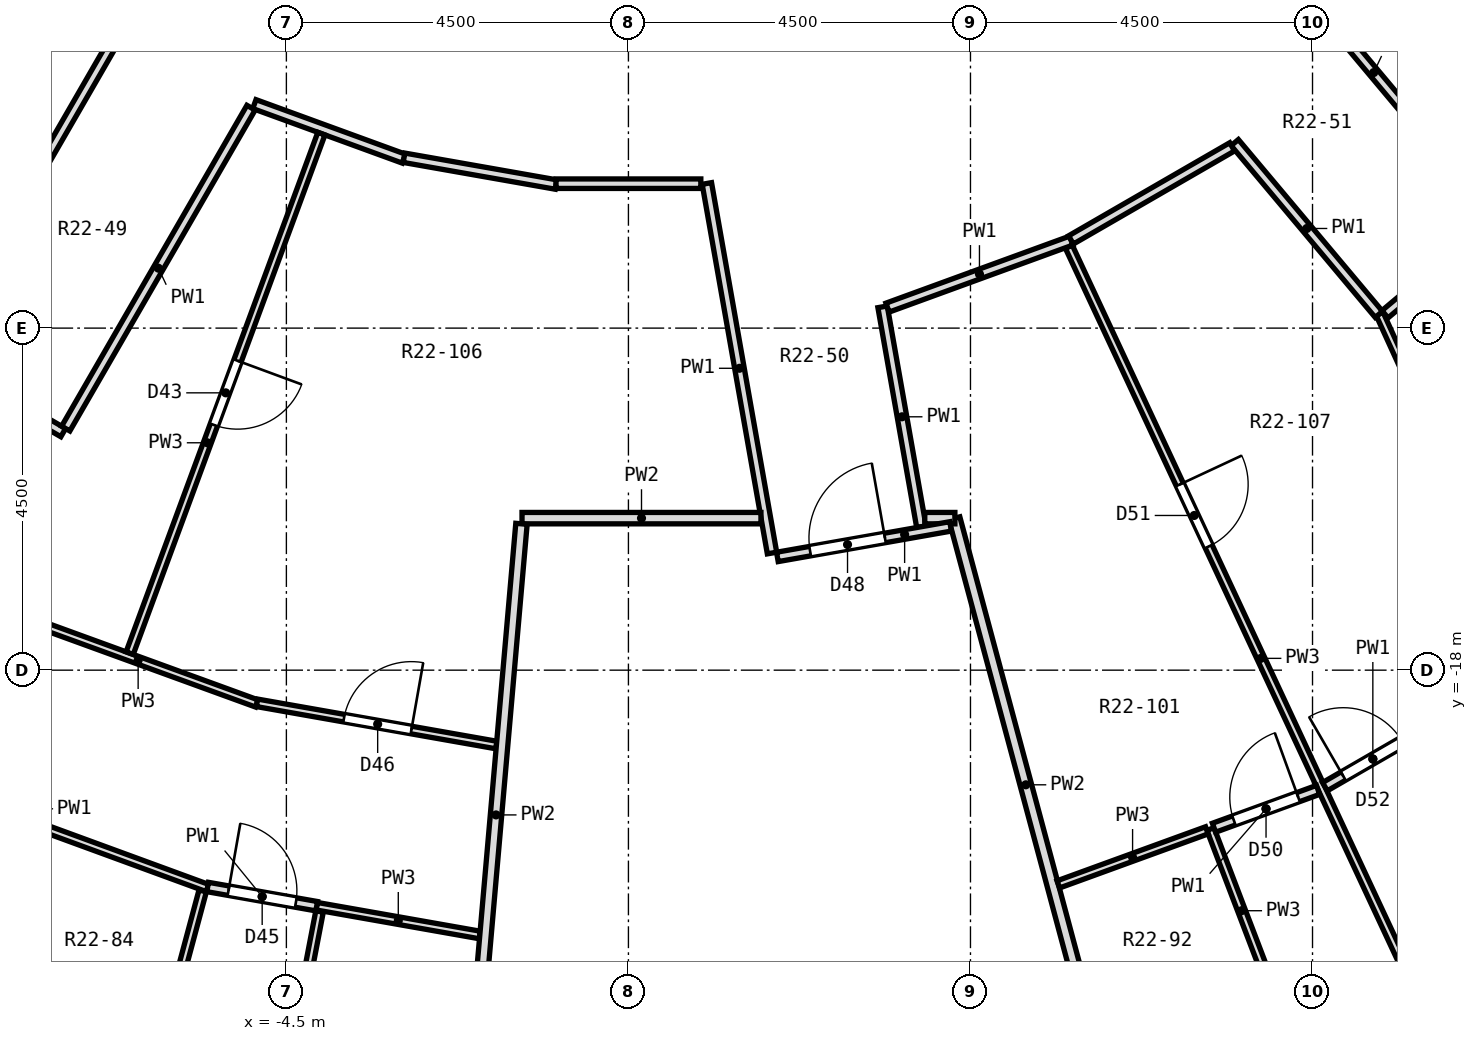
"""IFC4 building model, lengths in metres.
Left out: names, types, materials, properties, quantities, classifications, styles, units other than length and angle.
Written with IfcOpenShell. Run it as: python <this file> out.ifc"""

import sys

from ifc_helpers import new_model, si_unit, direction, frame, frame_2d, origin, place, context, subcontext, project, spatial, rectangle, extrude, element, fill, save


model = new_model("IFC4")
c1 = context("Model", 3, precision=1e-05, world=origin(), true_north=direction((0.0, 1.0)))
c2 = subcontext(c1, "Body", "Model", "MODEL_VIEW")
j1 = project(units=[si_unit("LENGTHUNIT", "METRE"), si_unit("PLANEANGLEUNIT", "RADIAN")], contexts=[c1])
p1 = place(None, origin())
s1 = spatial("IfcSite", under=j1, at=p1, CompositionType="ELEMENT")
p2 = place(p1, origin())
s2 = spatial("IfcBuilding", under=s1, at=p2, CompositionType="ELEMENT")
p3 = place(p2, frame((0.0, 0.0, 141.4)))
s3 = spatial("IfcBuildingStorey", under=s2, at=p3, CompositionType="ELEMENT", Elevation=141.4)
p4 = place(p3, frame((1.032, -11.597, 0.0), z_axis=(0.0, 0.0, 1.0), x_axis=(0.173613257536, -0.984813909735, 0.0)))
e1 = element("IfcWall", 1, at=p4, inside=s3, PredefinedType="PARTITIONING", context=c2, shape_type="SweptSolid", body=[
    extrude(rectangle(XDim=4.937, YDim=0.125, at=frame_2d((2.469, 0.0))), origin(), (0.0, 0.0, 1.0), 2.8),
])
p5 = place(p3, frame((3.344, -13.22, 0.0), z_axis=(0.0, 0.0, 1.0), x_axis=(0.173704731119, -0.984797779438, 0.0)))
e2 = element("IfcWall", 2, at=p5, inside=s3, PredefinedType="PARTITIONING", context=c2, shape_type="SweptSolid", body=[
    extrude(rectangle(XDim=2.938, YDim=0.125, at=frame_2d((1.469, 0.0))), origin(), (0.0, 0.0, 1.0), 2.8),
])
p6 = place(p3, frame((4.288, -16.002, 0.0), z_axis=(0.0, 0.0, 1.0), x_axis=(0.25900000819, -0.965877319207, 0.0)))
e3 = element("IfcWall", 3, at=p6, inside=s3, PredefinedType="PARTITIONING", context=c2, shape_type="SweptSolid", body=[
    extrude(rectangle(XDim=7.259, YDim=0.15, at=frame_2d((3.63, 0.0))), origin(), (0.0, 0.0, 1.0), 2.8),
])
p7 = place(p3, frame((7.657, -20.09, 0.0), z_axis=(0.0, 0.0, 1.0), x_axis=(0.35616749028, -0.934422130981, 0.0)))
e4 = element("IfcWall", 4, at=p7, inside=s3, PredefinedType="PARTITIONING", context=c2, shape_type="SweptSolid", body=[
    extrude(rectangle(XDim=2.3, YDim=0.1, at=frame_2d((1.15, 0.0))), origin(), (0.0, 0.0, 1.0), 2.8),
])
p8 = place(p3, frame((9.883, -13.312, 0.0), z_axis=(0.0, 0.0, 1.0), x_axis=(0.415273903312, -0.909696424764, 0.0)))
e5 = element("IfcWall", 5, at=p8, inside=s3, PredefinedType="PARTITIONING", context=c2, shape_type="SweptSolid", body=[
    extrude(rectangle(XDim=5.0, YDim=0.1, at=frame_2d((2.5, 0.0))), origin(), (0.0, 0.0, 1.0), 2.8),
])
p9 = place(p8, frame((3.166, 0.0, 0.0)))
e6 = element("IfcOpeningElement", 6, at=p9, cuts=e5, PredefinedType="OPENING", context=c2, shape_type="SweptSolid", body=[
    extrude(rectangle(XDim=0.9, YDim=2.1, at=frame_2d((0.45, 1.05))), frame((0.0, 0.062, 0.0), z_axis=(0.0, -1.0, 0.0), x_axis=(1.0, 0.0, 0.0)), (0.0, 0.0, 1.0), 0.124),
])
p10 = place(p3, frame((5.794, -12.43, 0.0), z_axis=(0.0, 0.0, 1.0), x_axis=(0.422795993745, -0.906224888023, 0.0)))
e7 = element("IfcWall", 7, at=p10, inside=s3, PredefinedType="PARTITIONING", context=c2, shape_type="SweptSolid", body=[
    extrude(rectangle(XDim=11.951, YDim=0.1, at=frame_2d((5.975, 0.0))), origin(), (0.0, 0.0, 1.0), 2.8),
])
p11 = place(p10, frame((3.451, 0.0, 0.0)))
e8 = element("IfcOpeningElement", 8, at=p11, cuts=e7, PredefinedType="OPENING", context=c2, shape_type="SweptSolid", body=[
    extrude(rectangle(XDim=0.9, YDim=2.1, at=frame_2d((0.45, 1.05))), frame((0.0, 0.062, 0.0), z_axis=(0.0, -1.0, 0.0), x_axis=(1.0, 0.0, 0.0)), (0.0, 0.0, 1.0), 0.124),
])
p12 = place(p3, frame((7.977, -11.059, 0.0), z_axis=(0.0, 0.0, 1.0), x_axis=(0.642679638204, -0.766135028985, 0.0)))
e9 = element("IfcWall", 9, at=p12, inside=s3, PredefinedType="PARTITIONING", context=c2, shape_type="SweptSolid", body=[
    extrude(rectangle(XDim=2.95, YDim=0.125, at=frame_2d((1.475, 0.0))), origin(), (0.0, 0.0, 1.0), 2.8),
])
p13 = place(p3, frame((8.22, -8.247, 0.0), z_axis=(0.0, 0.0, 1.0), x_axis=(0.642555132876, -0.766239454228, 0.0)))
e10 = element("IfcWall", 10, at=p13, inside=s3, PredefinedType="PARTITIONING", context=c2, shape_type="SweptSolid", body=[
    extrude(rectangle(XDim=4.937, YDim=0.125, at=frame_2d((2.468, 0.0))), origin(), (0.0, 0.0, 1.0), 2.8),
])
p14 = place(p3, frame((-9.166, -13.876, 0.0), z_axis=(0.0, 0.0, 1.0), x_axis=(0.866008543052, -0.500029202507, 0.0)))
e11 = element("IfcWall", 11, at=p14, inside=s3, PredefinedType="PARTITIONING", context=c2, shape_type="SweptSolid", body=[
    extrude(rectangle(XDim=1.998, YDim=0.125, at=frame_2d((0.999, 0.0))), origin(), (0.0, 0.0, 1.0), 2.8),
])
p15 = place(p3, frame((-7.704, -20.073, 0.0), z_axis=(0.0, 0.0, 1.0), x_axis=(0.939002837997, -0.343909392476, 0.0)))
e12 = element("IfcWall", 12, at=p15, inside=s3, PredefinedType="PARTITIONING", context=c2, shape_type="SweptSolid", body=[
    extrude(rectangle(XDim=2.306, YDim=0.1, at=frame_2d((1.153, 0.0))), origin(), (0.0, 0.0, 1.0), 2.8),
])
p16 = place(p3, frame((-8.013, -17.301, 0.0), z_axis=(0.0, 0.0, 1.0), x_axis=(0.939703357515, -0.341990642965, 0.0)))
e13 = element("IfcWall", 13, at=p16, inside=s3, PredefinedType="PARTITIONING", context=c2, shape_type="SweptSolid", body=[
    extrude(rectangle(XDim=3.325, YDim=0.1, at=frame_2d((1.663, 0.0))), origin(), (0.0, 0.0, 1.0), 2.8),
])
p17 = place(p3, frame((-4.921, -10.553, 0.0), z_axis=(0.0, 0.0, 1.0), x_axis=(0.939408005118, -0.342801108399, 0.0)))
e14 = element("IfcWall", 14, at=p17, inside=s3, PredefinedType="PARTITIONING", context=c2, shape_type="SweptSolid", body=[
    extrude(rectangle(XDim=2.093, YDim=0.125, at=frame_2d((1.046, 0.0))), origin(), (0.0, 0.0, 1.0), 2.8),
])
p18 = place(p3, frame((-4.101, -21.105, 0.0), z_axis=(0.0, 0.0, 1.0), x_axis=(0.984793705714, -0.173727825019, 0.0)))
e15 = element("IfcWall", 15, at=p18, inside=s3, PredefinedType="PARTITIONING", context=c2, shape_type="SweptSolid", body=[
    extrude(rectangle(XDim=2.18, YDim=0.1, at=frame_2d((1.09, 0.0))), origin(), (0.0, 0.0, 1.0), 2.8),
])
p19 = place(p3, frame((-5.536, -20.853, 0.0), z_axis=(0.0, 0.0, 1.0), x_axis=(0.984862774054, -0.173335848233, 0.0)))
e16 = element("IfcWall", 16, at=p19, inside=s3, PredefinedType="PARTITIONING", context=c2, shape_type="SweptSolid", body=[
    extrude(rectangle(XDim=1.456, YDim=0.125, at=frame_2d((0.728, 0.0))), origin(), (0.0, 0.0, 1.0), 2.8),
])
p20 = place(p19, frame((0.278, 0.0, 0.0)))
e17 = element("IfcOpeningElement", 17, at=p20, cuts=e16, PredefinedType="OPENING", context=c2, shape_type="SweptSolid", body=[
    extrude(rectangle(XDim=0.9, YDim=2.1, at=frame_2d((0.45, 1.05))), frame((0.0, 0.074, 0.0), z_axis=(0.0, -1.0, 0.0), x_axis=(1.0, 0.0, 0.0)), (0.0, 0.0, 1.0), 0.149),
])
p21 = place(p3, frame((-4.887, -18.43, 0.0), z_axis=(0.0, 0.0, 1.0), x_axis=(0.984827318257, -0.173537181071, 0.0)))
e18 = element("IfcWall", 18, at=p21, inside=s3, PredefinedType="PARTITIONING", context=c2, shape_type="SweptSolid", body=[
    extrude(rectangle(XDim=3.199, YDim=0.1, at=frame_2d((1.6, 0.0))), origin(), (0.0, 0.0, 1.0), 2.8),
])
p22 = place(p21, frame((1.162, 0.0, 0.0)))
e19 = element("IfcOpeningElement", 19, at=p22, cuts=e18, PredefinedType="OPENING", context=c2, shape_type="SweptSolid", body=[
    extrude(rectangle(XDim=0.9, YDim=2.1, at=frame_2d((0.45, 1.05))), frame((0.0, 0.062, 0.0), z_axis=(0.0, -1.0, 0.0), x_axis=(1.0, 0.0, 0.0)), (0.0, 0.0, 1.0), 0.124),
])
p23 = place(p3, frame((-2.952, -11.259, 0.0), z_axis=(0.0, 0.0, 1.0), x_axis=(0.984837972304, -0.173476708256, 0.0)))
e20 = element("IfcWall", 20, at=p23, inside=s3, PredefinedType="PARTITIONING", context=c2, shape_type="SweptSolid", body=[
    extrude(rectangle(XDim=2.031, YDim=0.125, at=frame_2d((1.015, 0.0))), origin(), (0.0, 0.0, 1.0), 2.8),
])
p24 = place(p3, frame((-1.4, -16.0, 0.0), z_axis=(0.0, 0.0, 1.0), x_axis=(1.0, 0.0, 0.0)))
e21 = element("IfcWall", 21, at=p24, inside=s3, PredefinedType="PARTITIONING", context=c2, shape_type="SweptSolid", body=[
    extrude(rectangle(XDim=3.143, YDim=0.15, at=frame_2d((1.572, 0.0))), origin(), (0.0, 0.0, 1.0), 2.8),
])
p25 = place(p3, frame((3.899, -16.0, 0.0), z_axis=(0.0, 0.0, 1.0), x_axis=(1.0, 0.0, 0.0)))
e22 = element("IfcWall", 22, at=p25, inside=s3, PredefinedType="PARTITIONING", context=c2, shape_type="SweptSolid", body=[
    extrude(rectangle(XDim=0.396, YDim=0.15, at=frame_2d((0.198, 0.0))), origin(), (0.0, 0.0, 1.0), 2.8),
])
p26 = place(p3, frame((-0.952, -11.6, 0.0), z_axis=(0.0, 0.0, 1.0), x_axis=(1.0, 0.0, 0.0)))
e23 = element("IfcWall", 23, at=p26, inside=s3, PredefinedType="PARTITIONING", context=c2, shape_type="SweptSolid", body=[
    extrude(rectangle(XDim=1.905, YDim=0.125, at=frame_2d((0.952, 0.0))), origin(), (0.0, 0.0, 1.0), 2.8),
])
p27 = place(p3, frame((1.959, -16.51, 0.0), z_axis=(0.0, 0.0, 1.0), x_axis=(0.984826011904, 0.173544594492, 0.0)))
e24 = element("IfcWall", 24, at=p27, inside=s3, PredefinedType="PARTITIONING", context=c2, shape_type="SweptSolid", body=[
    extrude(rectangle(XDim=2.314, YDim=0.125, at=frame_2d((1.157, 0.0))), origin(), (0.0, 0.0, 1.0), 2.8),
])
p28 = place(p27, frame((0.437, 0.0, 0.0)))
e25 = element("IfcOpeningElement", 25, at=p28, cuts=e24, PredefinedType="OPENING", context=c2, shape_type="SweptSolid", body=[
    extrude(rectangle(XDim=1.0, YDim=2.1, at=frame_2d((0.5, 1.05))), frame((0.0, 0.074, 0.0), z_axis=(0.0, -1.0, 0.0), x_axis=(1.0, 0.0, 0.0)), (0.0, 0.0, 1.0), 0.149),
])
p29 = place(p3, frame((5.656, -20.818, 0.0), z_axis=(0.0, 0.0, 1.0), x_axis=(0.939728291625, 0.341922122596, 0.0)))
e26 = element("IfcWall", 26, at=p29, inside=s3, PredefinedType="PARTITIONING", context=c2, shape_type="SweptSolid", body=[
    extrude(rectangle(XDim=2.08, YDim=0.1, at=frame_2d((1.04, 0.0))), origin(), (0.0, 0.0, 1.0), 2.8),
])
p30 = place(p3, frame((7.704, -20.073, 0.0), z_axis=(0.0, 0.0, 1.0), x_axis=(0.939788529673, 0.341756520778, 0.0)))
e27 = element("IfcWall", 27, at=p30, inside=s3, PredefinedType="PARTITIONING", context=c2, shape_type="SweptSolid", body=[
    extrude(rectangle(XDim=1.457, YDim=0.125, at=frame_2d((0.728, 0.0))), origin(), (0.0, 0.0, 1.0), 2.8),
])
p31 = place(p30, frame((0.278, 0.0, 0.0)))
e28 = element("IfcOpeningElement", 28, at=p31, cuts=e27, PredefinedType="OPENING", context=c2, shape_type="SweptSolid", body=[
    extrude(rectangle(XDim=0.9, YDim=2.1, at=frame_2d((0.45, 1.05))), frame((0.0, 0.074, 0.0), z_axis=(0.0, -1.0, 0.0), x_axis=(1.0, 0.0, 0.0)), (0.0, 0.0, 1.0), 0.149),
])
p32 = place(p3, frame((3.409, -13.23, 0.0), z_axis=(0.0, 0.0, 1.0), x_axis=(0.939430059453, 0.34274066493, 0.0)))
e29 = element("IfcWall", 29, at=p32, inside=s3, PredefinedType="PARTITIONING", context=c2, shape_type="SweptSolid", body=[
    extrude(rectangle(XDim=2.573, YDim=0.125, at=frame_2d((1.287, 0.0))), origin(), (0.0, 0.0, 1.0), 2.8),
])
p33 = place(p3, frame((9.163, -19.533, 0.0), z_axis=(0.0, 0.0, 1.0), x_axis=(0.865819905352, 0.500355764928, 0.0)))
e30 = element("IfcWall", 30, at=p33, inside=s3, PredefinedType="PARTITIONING", context=c2, shape_type="SweptSolid", body=[
    extrude(rectangle(XDim=1.457, YDim=0.125, at=frame_2d((0.729, 0.0))), origin(), (0.0, 0.0, 1.0), 2.8),
])
p34 = place(p33, frame((0.279, 0.0, 0.0)))
e31 = element("IfcOpeningElement", 31, at=p34, cuts=e30, PredefinedType="OPENING", context=c2, shape_type="SweptSolid", body=[
    extrude(rectangle(XDim=0.9, YDim=2.1, at=frame_2d((0.45, 1.05))), frame((0.0, 0.074, 0.0), z_axis=(0.0, -1.0, 0.0), x_axis=(1.0, 0.0, 0.0)), (0.0, 0.0, 1.0), 0.149),
])
p35 = place(p3, frame((5.822, -12.34, 0.0), z_axis=(0.0, 0.0, 1.0), x_axis=(0.865951440693, 0.500128085955, 0.0)))
e32 = element("IfcWall", 32, at=p35, inside=s3, PredefinedType="PARTITIONING", context=c2, shape_type="SweptSolid", body=[
    extrude(rectangle(XDim=2.448, YDim=0.125, at=frame_2d((1.224, 0.0))), origin(), (0.0, 0.0, 1.0), 2.8),
])
p36 = place(p3, frame((9.954, -13.317, 0.0), z_axis=(0.0, 0.0, 1.0), x_axis=(0.766162509907, 0.642646876919, 0.0)))
e33 = element("IfcWall", 33, at=p36, inside=s3, PredefinedType="PARTITIONING", context=c2, shape_type="SweptSolid", body=[
    extrude(rectangle(XDim=1.87, YDim=0.125, at=frame_2d((0.935, 0.0))), origin(), (0.0, 0.0, 1.0), 2.8),
])
for number, where, z_axis, x_axis in (
    (34, (-7.403, -14.822, 0.0), (0.0, 0.0, 1.0), (0.5, 0.866, 0.0)),
    (35, (-9.135, -13.822, 0.0), (0.0, 0.0, 1.0), (0.5, 0.866, 0.0)),
):
    element("IfcWall", number, at=place(p3, frame(where, z_axis=z_axis, x_axis=x_axis)), inside=s3, PredefinedType="PARTITIONING", context=c2, shape_type="SweptSolid", body=[
        extrude(rectangle(XDim=4.875, YDim=0.125, at=frame_2d((2.438, 0.0))), origin(), (0.0, 0.0, 1.0), 2.8),
    ])
p37 = place(p3, frame((-6.562, -17.776, 0.0), z_axis=(0.0, 0.0, 1.0), x_axis=(0.346197589544, 0.938161622, 0.0)))
e36 = element("IfcWall", 36, at=p37, inside=s3, PredefinedType="PARTITIONING", context=c2, shape_type="SweptSolid", body=[
    extrude(rectangle(XDim=7.285, YDim=0.1, at=frame_2d((3.643, 0.0))), origin(), (0.0, 0.0, 1.0), 2.8),
])
p38 = place(p37, frame((3.2, 0.0, 0.0)))
e37 = element("IfcOpeningElement", 37, at=p38, cuts=e36, PredefinedType="OPENING", context=c2, shape_type="SweptSolid", body=[
    extrude(rectangle(XDim=0.9, YDim=2.1, at=frame_2d((0.45, 1.05))), frame((0.0, 0.062, 0.0), z_axis=(0.0, -1.0, 0.0), x_axis=(1.0, 0.0, 0.0)), (0.0, 0.0, 1.0), 0.124),
])
p39 = place(p3, frame((-6.644, -24.79, 0.0), z_axis=(0.0, 0.0, 1.0), x_axis=(0.259176889868, 0.965829871022, 0.0)))
e38 = element("IfcWall", 38, at=p39, inside=s3, PredefinedType="PARTITIONING", context=c2, shape_type="SweptSolid", body=[
    extrude(rectangle(XDim=4.023, YDim=0.1, at=frame_2d((2.012, 0.0))), origin(), (0.0, 0.0, 1.0), 2.8),
])
p40 = place(p3, frame((-4.477, -23.324, 0.0), z_axis=(0.0, 0.0, 1.0), x_axis=(0.188685986474, 0.982037473067, 0.0)))
e39 = element("IfcWall", 39, at=p40, inside=s3, PredefinedType="PARTITIONING", context=c2, shape_type="SweptSolid", body=[
    extrude(rectangle(XDim=2.188, YDim=0.1, at=frame_2d((1.094, 0.0))), origin(), (0.0, 0.0, 1.0), 2.8),
])
p41 = place(p3, frame((-2.077, -23.735, 0.0), z_axis=(0.0, 0.0, 1.0), x_axis=(0.087062572149, 0.996202845073, 0.0)))
e40 = element("IfcWall", 40, at=p41, inside=s3, PredefinedType="PARTITIONING", context=c2, shape_type="SweptSolid", body=[
    extrude(rectangle(XDim=7.689, YDim=0.15, at=frame_2d((3.845, 0.0))), origin(), (0.0, 0.0, 1.0), 2.8),
])
p42 = place(p38, frame((0.9, 0.0, 0.0), z_axis=(0.0, 0.0, 1.0), x_axis=(-1.0, 0.0, 0.0)))
e41 = element("IfcDoor", 41, at=p42, inside=s3, OperationType="SINGLE_SWING_LEFT", PredefinedType="DOOR", context=c2, shape_type="SweptSolid", body=[
    extrude(rectangle(XDim=0.9, YDim=2.1, at=frame_2d((0.45, 1.05))), frame((0.0, 0.025, 0.0), z_axis=(0.0, -1.0, 0.0), x_axis=(1.0, 0.0, 0.0)), (0.0, 0.0, 1.0), 0.05),
])
fill(e37, e41)
p43 = place(p20, origin())
e42 = element("IfcDoor", 42, at=p43, inside=s3, OperationType="SINGLE_SWING_LEFT", PredefinedType="DOOR", context=c2, shape_type="SweptSolid", body=[
    extrude(rectangle(XDim=0.9, YDim=2.1, at=frame_2d((0.45, 1.05))), frame((0.0, 0.025, 0.0), z_axis=(0.0, -1.0, 0.0), x_axis=(1.0, 0.0, 0.0)), (0.0, 0.0, 1.0), 0.05),
])
fill(e17, e42)
p44 = place(p22, origin())
e43 = element("IfcDoor", 43, at=p44, inside=s3, OperationType="SINGLE_SWING_RIGHT", PredefinedType="DOOR", context=c2, shape_type="SweptSolid", body=[
    extrude(rectangle(XDim=0.9, YDim=2.1, at=frame_2d((0.45, 1.05))), frame((0.0, 0.025, 0.0), z_axis=(0.0, -1.0, 0.0), x_axis=(1.0, 0.0, 0.0)), (0.0, 0.0, 1.0), 0.05),
])
fill(e19, e43)
p45 = place(p28, origin())
e44 = element("IfcDoor", 44, at=p45, inside=s3, OperationType="SINGLE_SWING_RIGHT", PredefinedType="DOOR", context=c2, shape_type="SweptSolid", body=[
    extrude(rectangle(XDim=1.0, YDim=2.1, at=frame_2d((0.5, 1.05))), frame((0.0, 0.025, 0.0), z_axis=(0.0, -1.0, 0.0), x_axis=(1.0, 0.0, 0.0)), (0.0, 0.0, 1.0), 0.05),
])
fill(e25, e44)
p46 = place(p31, origin())
e45 = element("IfcDoor", 45, at=p46, inside=s3, OperationType="SINGLE_SWING_RIGHT", PredefinedType="DOOR", context=c2, shape_type="SweptSolid", body=[
    extrude(rectangle(XDim=0.9, YDim=2.1, at=frame_2d((0.45, 1.05))), frame((0.0, 0.025, 0.0), z_axis=(0.0, -1.0, 0.0), x_axis=(1.0, 0.0, 0.0)), (0.0, 0.0, 1.0), 0.05),
])
fill(e28, e45)
p47 = place(p11, origin())
e46 = element("IfcDoor", 46, at=p47, inside=s3, OperationType="SINGLE_SWING_LEFT", PredefinedType="DOOR", context=c2, shape_type="SweptSolid", body=[
    extrude(rectangle(XDim=0.9, YDim=2.1, at=frame_2d((0.45, 1.05))), frame((0.0, 0.025, 0.0), z_axis=(0.0, -1.0, 0.0), x_axis=(1.0, 0.0, 0.0)), (0.0, 0.0, 1.0), 0.05),
])
fill(e8, e46)
p48 = place(p34, origin())
e47 = element("IfcDoor", 47, at=p48, inside=s3, OperationType="SINGLE_SWING_LEFT", PredefinedType="DOOR", context=c2, shape_type="SweptSolid", body=[
    extrude(rectangle(XDim=0.9, YDim=2.1, at=frame_2d((0.45, 1.05))), frame((0.0, 0.025, 0.0), z_axis=(0.0, -1.0, 0.0), x_axis=(1.0, 0.0, 0.0)), (0.0, 0.0, 1.0), 0.05),
])
fill(e31, e47)
save(model, sys.argv[1])
